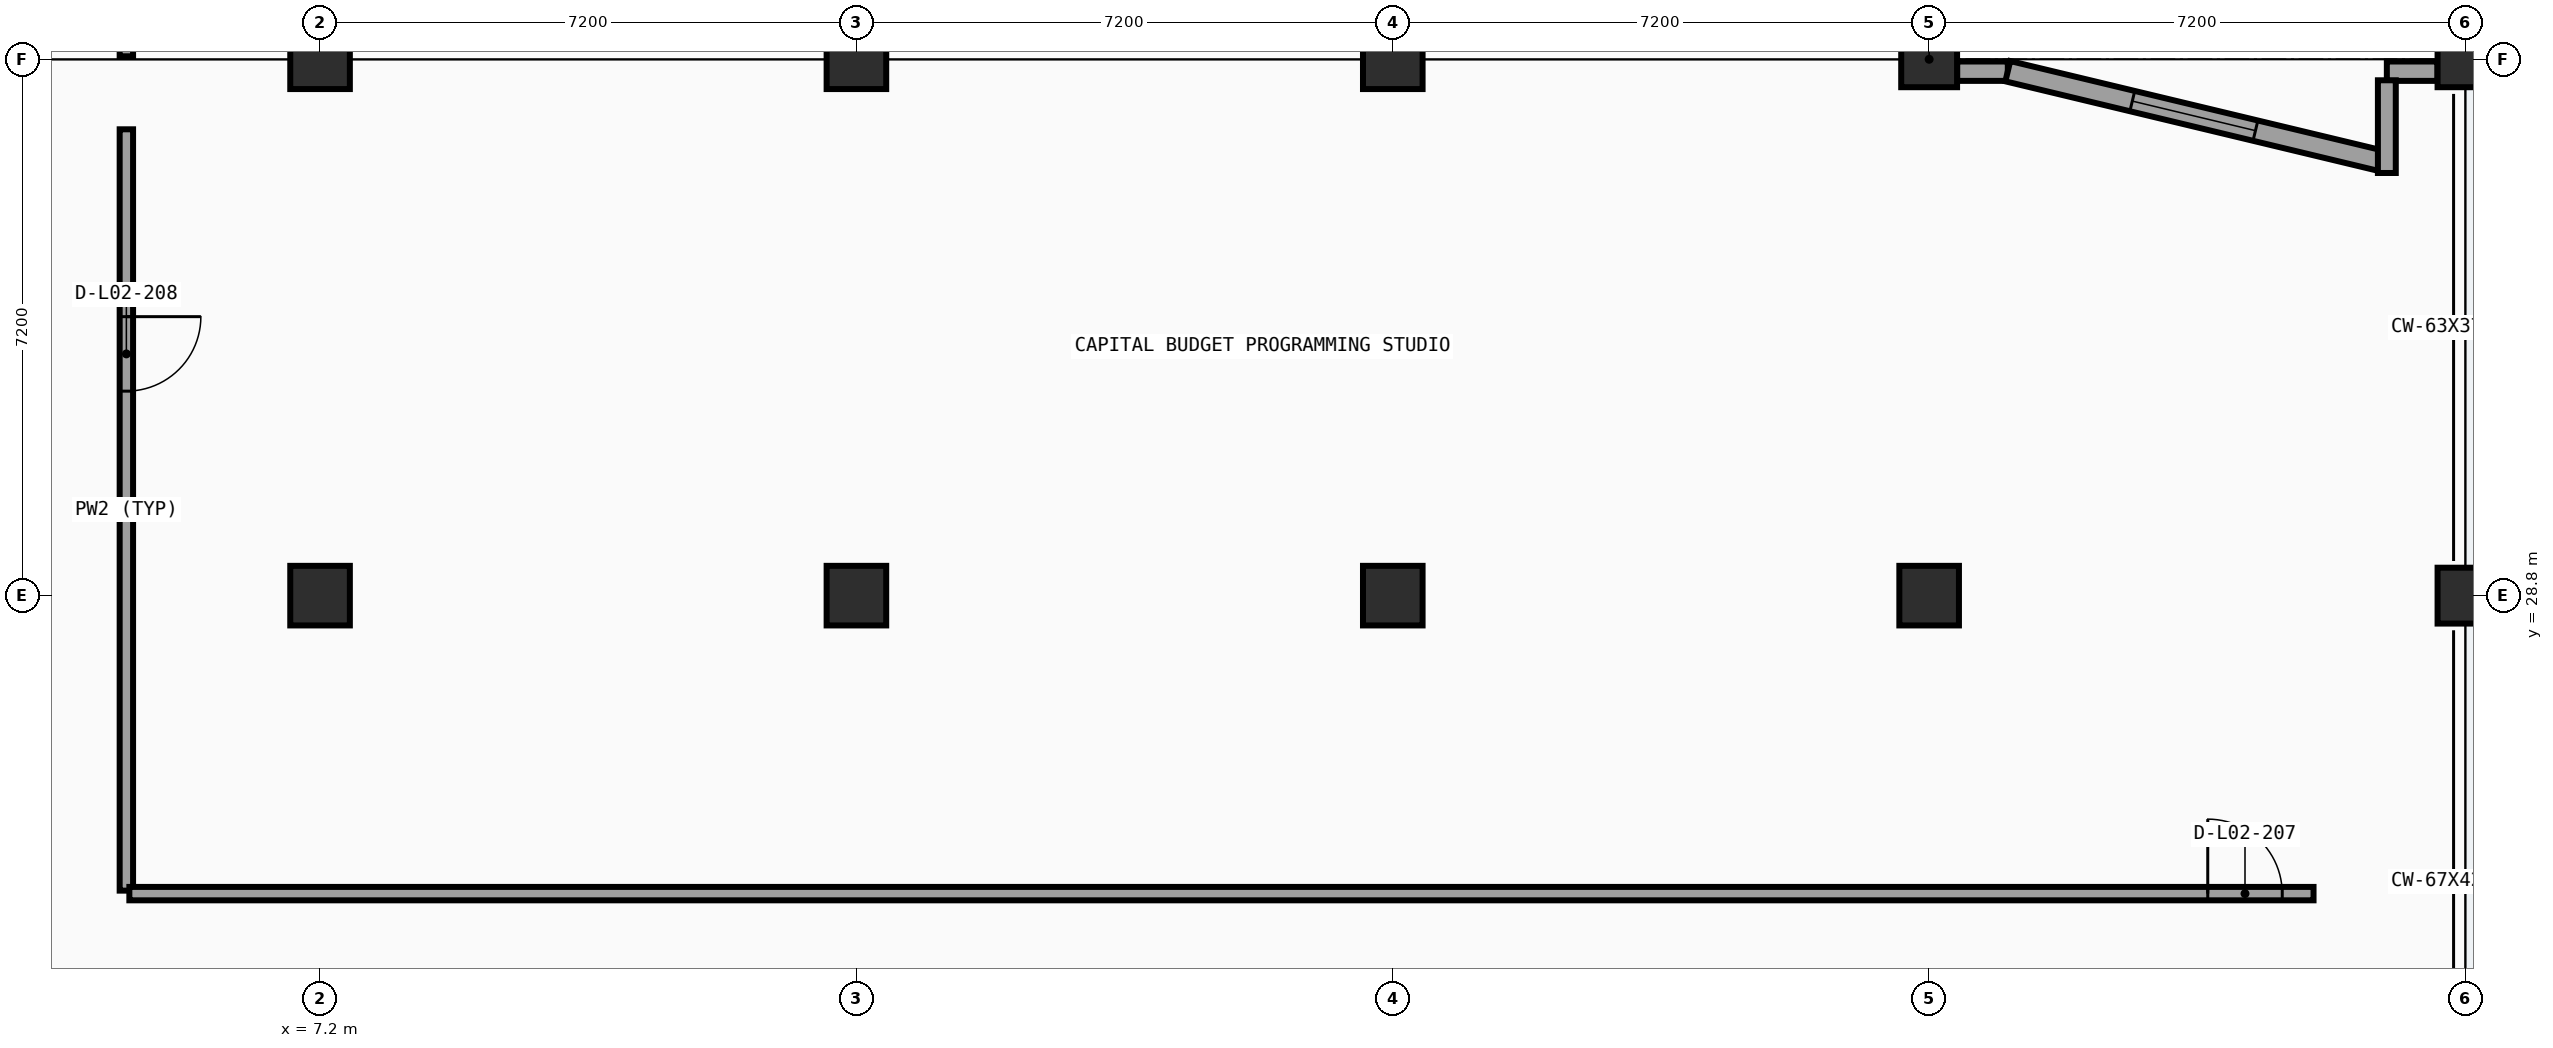
"""IFC4 building model, lengths in metres.
Left out: names, types, materials, properties, quantities, classifications, styles, units other than length and angle.
Written with IfcOpenShell. Run it as: python <this file> out.ifc"""

import sys

from ifc_helpers import new_model, si_unit, direction, frame, frame_2d, origin, origin_2d, place, context, subcontext, project, spatial, rectangle, extrude, element, fill, save


model = new_model("IFC4")
c1 = context("Model", 3, precision=1e-05, world=origin(), true_north=direction((0.0, 1.0)))
c2 = subcontext(c1, "Body", "Model", "MODEL_VIEW")
j1 = project(units=[si_unit("LENGTHUNIT", "METRE"), si_unit("PLANEANGLEUNIT", "RADIAN")], contexts=[c1])
p1 = place(None, origin())
s1 = spatial("IfcSite", under=j1, at=p1, CompositionType="ELEMENT")
p2 = place(p1, origin())
s2 = spatial("IfcBuilding", under=s1, at=p2, CompositionType="ELEMENT")
p3 = place(p2, frame((0.0, 0.0, 10.2)))
s3 = spatial("IfcBuildingStorey", under=s2, at=p3, CompositionType="ELEMENT", Elevation=10.2)
for number, where, z_axis, x_axis in (
    (1, (7.2, 28.8, 0.0), (0.0, 0.0, 1.0), (1.0, 0.0, 0.0)),
    (2, (7.2, 36.0, 0.0), (0.0, 0.0, 1.0), (1.0, 0.0, 0.0)),
    (3, (14.4, 28.8, 0.0), (0.0, 0.0, 1.0), (1.0, 0.0, 0.0)),
    (4, (14.4, 36.0, 0.0), (0.0, 0.0, 1.0), (1.0, 0.0, 0.0)),
    (5, (21.6, 28.8, 0.0), (0.0, 0.0, 1.0), (1.0, 0.0, 0.0)),
    (6, (21.6, 36.0, 0.0), (0.0, 0.0, 1.0), (1.0, 0.0, 0.0)),
    (7, (28.8, 28.8, 0.0), (0.0, 0.0, 1.0), (1.0, 0.0, 0.0)),
):
    element("IfcColumn", number, at=place(p3, frame(where, z_axis=z_axis, x_axis=x_axis)), inside=s3, PredefinedType="COLUMN", context=c2, shape_type="SweptSolid", body=[
        extrude(rectangle(XDim=0.8, YDim=0.8, at=origin_2d()), origin(), (0.0, 0.0, 1.0), 4.5),
    ])
for number, where, z_axis, x_axis in (
    (8, (28.8, 36.0, 0.0), (0.0, 0.0, 1.0), (1.0, 0.0, 0.0)),
    (9, (36.0, 28.8, 0.0), (0.0, 0.0, 1.0), (1.0, 0.0, 0.0)),
    (10, (36.0, 36.0, 0.0), (0.0, 0.0, 1.0), (1.0, 0.0, 0.0)),
):
    element("IfcColumn", number, at=place(p3, frame(where, z_axis=z_axis, x_axis=x_axis)), inside=s3, PredefinedType="COLUMN", context=c2, shape_type="SweptSolid", body=[
        extrude(rectangle(XDim=0.75, YDim=0.75, at=origin_2d()), origin(), (0.0, 0.0, 1.0), 4.5),
    ])
for number, where, z_axis, x_axis in (
    (11, (29.176, 35.84, 0.0), (0.0, 0.0, 1.0), (1.0, 0.0, 0.0)),
    (12, (34.944, 35.84, 0.0), (0.0, 0.0, 1.0), (1.0, 0.0, 0.0)),
):
    element("IfcWall", number, at=place(p3, frame(where, z_axis=z_axis, x_axis=x_axis)), inside=s3, PredefinedType="SOLIDWALL", context=c2, shape_type="SweptSolid", body=[
        extrude(rectangle(XDim=0.68, YDim=0.26, at=frame_2d((0.34, 0.0))), origin(), (0.0, 0.0, 1.0), 3.471),
    ])
p4 = place(p3, frame((29.856, 35.84, 0.0), z_axis=(0.0, 0.0, 1.0), x_axis=(0.972364435713, -0.233468208028, 0.0)))
e13 = element("IfcWall", 13, at=p4, inside=s3, PredefinedType="SOLIDWALL", context=c2, shape_type="SweptSolid", body=[
    extrude(rectangle(XDim=5.138, YDim=0.28, at=frame_2d((2.569, 0.0))), origin(), (0.0, 0.0, 1.0), 3.471),
])
p5 = place(p4, frame((1.719, 0.0, 0.8)))
e14 = element("IfcOpeningElement", 14, at=p5, cuts=e13, PredefinedType="OPENING", context=c2, shape_type="SweptSolid", body=[
    extrude(rectangle(XDim=1.7, YDim=1.85, at=frame_2d((0.85, 0.925))), frame((0.0, 0.15, 0.0), z_axis=(0.0, -1.0, 0.0), x_axis=(1.0, 0.0, 0.0)), (0.0, 0.0, 1.0), 0.3),
])
p6 = place(p3, frame((34.944, 34.473, 0.0), z_axis=(0.0, 0.0, 1.0), x_axis=(0.0, 1.0, 0.0)))
e15 = element("IfcWall", 15, at=p6, inside=s3, PredefinedType="SOLIDWALL", context=c2, shape_type="SweptSolid", body=[
    extrude(rectangle(XDim=1.245, YDim=0.24, at=frame_2d((0.622, 0.0))), origin(), (0.0, 0.0, 1.0), 4.24),
])
p7 = place(p3, frame((4.6, 24.84, 0.0), z_axis=(0.0, 0.0, 1.0), x_axis=(0.0, 1.0, 0.0)))
e16 = element("IfcWall", 16, at=p7, inside=s3, PredefinedType="PARTITIONING", context=c2, shape_type="SweptSolid", body=[
    extrude(rectangle(XDim=10.22, YDim=0.18, at=frame_2d((5.11, 0.0))), origin(), (0.0, 0.0, 1.0), 3.618),
])
p8 = place(p7, frame((6.705, 0.0, 0.0)))
e17 = element("IfcOpeningElement", 17, at=p8, cuts=e16, PredefinedType="OPENING", context=c2, shape_type="SweptSolid", body=[
    extrude(rectangle(XDim=1.0, YDim=2.1, at=frame_2d((0.5, 1.05))), frame((0.0, 0.1, 0.0), z_axis=(0.0, -1.0, 0.0), x_axis=(1.0, 0.0, 0.0)), (0.0, 0.0, 1.0), 0.2),
])
p9 = place(p3, frame((4.6, 36.04, 0.0), z_axis=(0.0, 0.0, 1.0), x_axis=(0.0, 1.0, 0.0)))
e18 = element("IfcWall", 18, at=p9, inside=s3, PredefinedType="PARTITIONING", context=c2, shape_type="SweptSolid", body=[
    extrude(rectangle(XDim=14.32, YDim=0.18, at=frame_2d((7.16, 0.0))), origin(), (0.0, 0.0, 1.0), 3.618),
])
p10 = place(p9, frame((3.54, 0.0, 0.0)))
e19 = element("IfcOpeningElement", 19, at=p10, cuts=e18, PredefinedType="OPENING", context=c2, shape_type="SweptSolid", body=[
    extrude(rectangle(XDim=1.0, YDim=2.1, at=frame_2d((0.5, 1.05))), frame((0.0, 0.1, 0.0), z_axis=(0.0, -1.0, 0.0), x_axis=(1.0, 0.0, 0.0)), (0.0, 0.0, 1.0), 0.2),
])
p11 = place(p3, frame((4.64, 24.8, 0.0), z_axis=(0.0, 0.0, 1.0), x_axis=(1.0, 0.0, 0.0)))
e20 = element("IfcWall", 20, at=p11, inside=s3, PredefinedType="PARTITIONING", context=c2, shape_type="SweptSolid", body=[
    extrude(rectangle(XDim=29.32, YDim=0.18, at=frame_2d((14.66, 0.0))), origin(), (0.0, 0.0, 1.0), 3.451),
])
p12 = place(p11, frame((27.9, 0.0, 0.0)))
e21 = element("IfcOpeningElement", 21, at=p12, cuts=e20, PredefinedType="OPENING", context=c2, shape_type="SweptSolid", body=[
    extrude(rectangle(XDim=1.0, YDim=2.1, at=frame_2d((0.5, 1.05))), frame((0.0, 0.1, 0.0), z_axis=(0.0, -1.0, 0.0), x_axis=(1.0, 0.0, 0.0)), (0.0, 0.0, 1.0), 0.2),
])
p13 = place(p5, origin())
e22 = element("IfcWindow", 22, at=p13, inside=s3, PartitioningType="SINGLE_PANEL", PredefinedType="WINDOW", context=c2, shape_type="SweptSolid", body=[
    extrude(rectangle(XDim=1.7, YDim=1.85, at=frame_2d((0.85, 0.925))), frame((0.0, 0.03, 0.0), z_axis=(0.0, -1.0, 0.0), x_axis=(1.0, 0.0, 0.0)), (0.0, 0.0, 1.0), 0.06),
])
fill(e14, e22)
p14 = place(p12, origin())
e23 = element("IfcDoor", 23, at=p14, inside=s3, OperationType="SINGLE_SWING_LEFT", PredefinedType="DOOR", context=c2, shape_type="SweptSolid", body=[
    extrude(rectangle(XDim=1.0, YDim=2.1, at=frame_2d((0.5, 1.05))), frame((0.0, 0.025, 0.0), z_axis=(0.0, -1.0, 0.0), x_axis=(1.0, 0.0, 0.0)), (0.0, 0.0, 1.0), 0.05),
])
fill(e21, e23)
p15 = place(p8, origin())
e24 = element("IfcDoor", 24, at=p15, inside=s3, OperationType="SINGLE_SWING_RIGHT", PredefinedType="DOOR", context=c2, shape_type="SweptSolid", body=[
    extrude(rectangle(XDim=1.0, YDim=2.1, at=frame_2d((0.5, 1.05))), frame((0.0, 0.025, 0.0), z_axis=(0.0, -1.0, 0.0), x_axis=(1.0, 0.0, 0.0)), (0.0, 0.0, 1.0), 0.05),
])
fill(e17, e24)
save(model, sys.argv[1])
